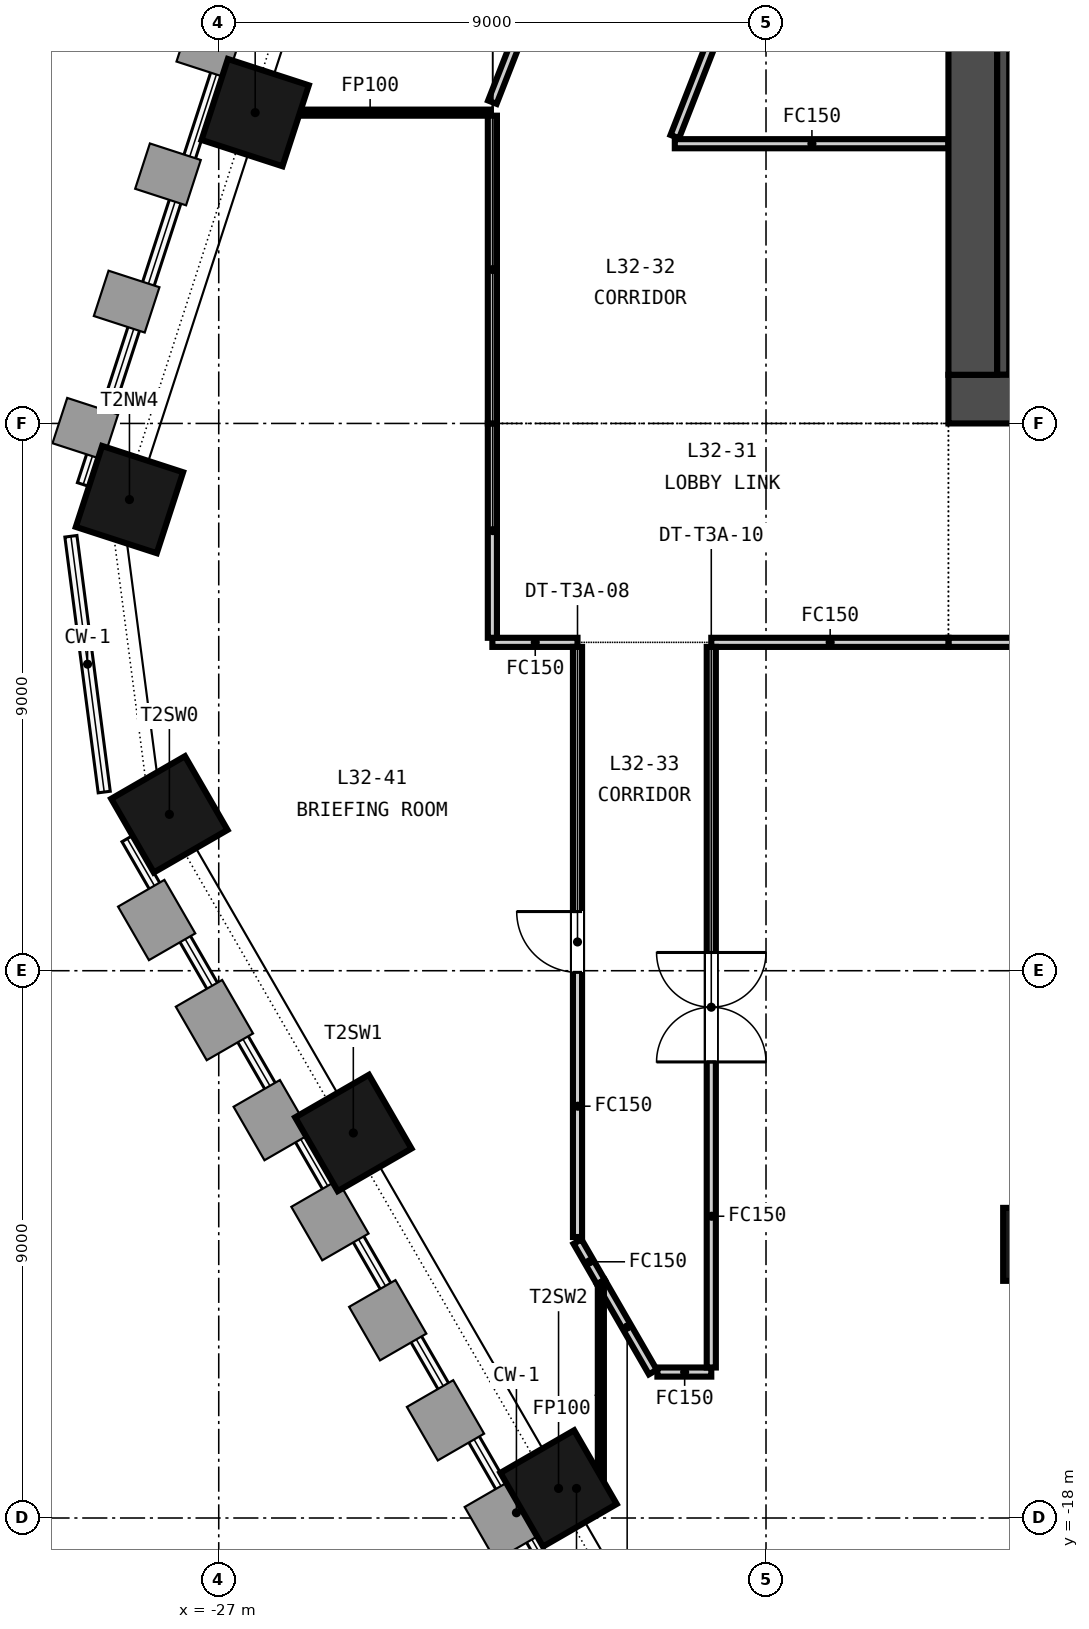
"""IFC4 building model, lengths in metres.
Left out: names, types, materials, properties, quantities, classifications, styles, units other than length and angle.
Written with IfcOpenShell. Run it as: python <this file> out.ifc"""

import sys

from ifc_helpers import new_model, si_unit, direction, frame, frame_2d, origin, origin_2d, place, context, subcontext, project, spatial, rectangle, extrude, element, fill, save


model = new_model("IFC4")
c1 = context("Model", 3, precision=1e-05, world=origin(), true_north=direction((0.0, 1.0)))
c2 = subcontext(c1, "Body", "Model", "MODEL_VIEW")
j1 = project(units=[si_unit("LENGTHUNIT", "METRE"), si_unit("PLANEANGLEUNIT", "RADIAN")], contexts=[c1])
p1 = place(None, origin())
s1 = spatial("IfcSite", under=j1, at=p1, CompositionType="ELEMENT")
p2 = place(p1, origin())
s2 = spatial("IfcBuilding", under=s1, at=p2, CompositionType="ELEMENT")
p3 = place(p2, frame((0.0, 0.0, 133.45)))
s3 = spatial("IfcBuildingStorey", under=s2, at=p3, CompositionType="ELEMENT", Elevation=133.45)
p4 = place(p3, frame((-15.0, 0.4, -0.15), z_axis=(0.0, 0.0, 1.0), x_axis=(1.0, 0.0, 0.0)))
e1 = element("IfcWall", 1, at=p4, inside=s3, PredefinedType="SOLIDWALL", context=c2, shape_type="SweptSolid", body=[
    extrude(rectangle(XDim=30.0, YDim=0.8, at=frame_2d((15.0, 0.0))), origin(), (0.0, 0.0, 1.0), 3.65),
])
p5 = place(p4, frame((5.8, 0.0, 0.15)))
e2 = element("IfcOpeningElement", 2, at=p5, cuts=e1, PredefinedType="OPENING", context=c2, shape_type="SweptSolid", body=[
    extrude(rectangle(XDim=2.4, YDim=2.4, at=frame_2d((1.2, 1.2))), frame((0.0, 0.41, 0.0), z_axis=(0.0, -1.0, 0.0), x_axis=(1.0, 0.0, 0.0)), (0.0, 0.0, 1.0), 0.82),
])
p6 = place(p4, frame((13.8, 0.0, 0.15)))
e3 = element("IfcOpeningElement", 3, at=p6, cuts=e1, PredefinedType="OPENING", context=c2, shape_type="SweptSolid", body=[
    extrude(rectangle(XDim=2.4, YDim=2.4, at=frame_2d((1.2, 1.2))), frame((0.0, 0.41, 0.0), z_axis=(0.0, -1.0, 0.0), x_axis=(1.0, 0.0, 0.0)), (0.0, 0.0, 1.0), 0.82),
])
p7 = place(p4, frame((21.8, 0.0, 0.15)))
e4 = element("IfcOpeningElement", 4, at=p7, cuts=e1, PredefinedType="OPENING", context=c2, shape_type="SweptSolid", body=[
    extrude(rectangle(XDim=2.4, YDim=2.4, at=frame_2d((1.2, 1.2))), frame((0.0, 0.41, 0.0), z_axis=(0.0, -1.0, 0.0), x_axis=(1.0, 0.0, 0.0)), (0.0, 0.0, 1.0), 0.82),
])
p8 = place(p4, frame((1.5, 0.0, 0.15)))
e5 = element("IfcOpeningElement", 5, at=p8, cuts=e1, PredefinedType="OPENING", context=c2, shape_type="SweptSolid", body=[
    extrude(rectangle(XDim=1.2, YDim=2.1, at=frame_2d((0.6, 1.05))), frame((0.0, 0.41, 0.0), z_axis=(0.0, -1.0, 0.0), x_axis=(1.0, 0.0, 0.0)), (0.0, 0.0, 1.0), 0.82),
])
p9 = place(p4, frame((27.3, 0.0, 0.15)))
e6 = element("IfcOpeningElement", 6, at=p9, cuts=e1, PredefinedType="OPENING", context=c2, shape_type="SweptSolid", body=[
    extrude(rectangle(XDim=1.2, YDim=2.1, at=frame_2d((0.6, 1.05))), frame((0.0, 0.41, 0.0), z_axis=(0.0, -1.0, 0.0), x_axis=(1.0, 0.0, 0.0)), (0.0, 0.0, 1.0), 0.82),
])
p10 = place(p3, frame((-14.6, 0.8, -0.15), z_axis=(0.0, 0.0, 1.0), x_axis=(0.0, 1.0, 0.0)))
e7 = element("IfcWall", 7, at=p10, inside=s3, PredefinedType="SOLIDWALL", context=c2, shape_type="SweptSolid", body=[
    extrude(rectangle(XDim=13.4, YDim=0.8, at=frame_2d((6.7, 0.0))), origin(), (0.0, 0.0, 1.0), 3.65),
])
for number, where, z_axis, x_axis in (
    (8, (-26.401, 5.111, -0.15), (0.0, 0.0, 1.0), (-0.309, -0.951, 0.0)),
    (9, (-28.468, -1.252, -0.15), (0.0, 0.0, 1.0), (-0.309, -0.951, 0.0)),
    (10, (-27.812, -6.429, -0.15), (0.0, 0.0, 1.0), (0.5, -0.866, 0.0)),
    (11, (-24.787, -11.668, -0.15), (0.0, 0.0, 1.0), (0.5, -0.866, 0.0)),
    (12, (-21.412, -17.514, -0.15), (0.0, 0.0, 1.0), (0.5, -0.866, 0.0)),
):
    element("IfcColumn", number, at=place(p3, frame(where, z_axis=z_axis, x_axis=x_axis)), inside=s3, PredefinedType="COLUMN", context=c2, shape_type="SweptSolid", body=[
        extrude(rectangle(XDim=1.4, YDim=1.4, at=origin_2d()), origin(), (0.0, 0.0, 1.0), 3.65),
    ])
p11 = place(p3, frame((-13.5, -13.5, -0.15), z_axis=(0.0, 0.0, 1.0), x_axis=(1.0, 0.0, 0.0)))
e13 = element("IfcColumn", 13, at=p11, inside=s3, PredefinedType="COLUMN", context=c2, shape_type="SweptSolid", body=[
    extrude(rectangle(XDim=1.2, YDim=1.2, at=origin_2d()), origin(), (0.0, 0.0, 1.0), 3.65),
])
p12 = place(p3, frame((-14.1, 0.8, 0.0), z_axis=(0.0, 0.0, 1.0), x_axis=(0.0, 1.0, 0.0)))
e14 = element("IfcWall", 14, at=p12, inside=s3, PredefinedType="SOLIDWALL", context=c2, shape_type="SweptSolid", body=[
    extrude(rectangle(XDim=13.4, YDim=0.2, at=frame_2d((6.7, 0.0))), origin(), (0.0, 0.0, 1.0), 3.5),
])
p13 = place(p3, frame((15.0, -3.6, 0.0), z_axis=(0.0, 0.0, 1.0), x_axis=(-1.0, 0.0, 0.0)))
e15 = element("IfcWall", 15, at=p13, inside=s3, PredefinedType="PARTITIONING", context=c2, shape_type="SweptSolid", body=[
    extrude(rectangle(XDim=30.0, YDim=0.15, at=frame_2d((15.0, 0.0))), origin(), (0.0, 0.0, 1.0), 2.741),
])
p14 = place(p13, frame((14.1, 0.0, 0.0)))
e16 = element("IfcOpeningElement", 16, at=p14, cuts=e15, PredefinedType="OPENING", context=c2, shape_type="SweptSolid", body=[
    extrude(rectangle(XDim=1.8, YDim=2.1, at=frame_2d((0.9, 1.05))), frame((0.0, 0.085, 0.0), z_axis=(0.0, -1.0, 0.0), x_axis=(1.0, 0.0, 0.0)), (0.0, 0.0, 1.0), 0.17),
])
p15 = place(p3, frame((-21.1, -3.6, 0.0), z_axis=(0.0, 0.0, 1.0), x_axis=(-1.0, 0.0, 0.0)))
e17 = element("IfcWall", 17, at=p15, inside=s3, PredefinedType="PARTITIONING", context=c2, shape_type="SweptSolid", body=[
    extrude(rectangle(XDim=1.4, YDim=0.15, at=frame_2d((0.7, 0.0))), origin(), (0.0, 0.0, 1.0), 2.741),
])
p16 = place(p3, frame((-15.0, -3.6, 0.0), z_axis=(0.0, 0.0, 1.0), x_axis=(-1.0, 0.0, 0.0)))
e18 = element("IfcWall", 18, at=p16, inside=s3, PredefinedType="PARTITIONING", context=c2, shape_type="SweptSolid", body=[
    extrude(rectangle(XDim=3.9, YDim=0.15, at=frame_2d((1.95, 0.0))), origin(), (0.0, 0.0, 1.0), 2.741),
])
p17 = place(p3, frame((-15.476, 15.0, 0.0), z_axis=(0.0, 0.0, 1.0), x_axis=(-0.364411853206, -0.931237886494, 0.0)))
e19 = element("IfcWall", 19, at=p17, inside=s3, PredefinedType="PARTITIONING", context=c2, shape_type="SweptSolid", body=[
    extrude(rectangle(XDim=11.042, YDim=0.15, at=frame_2d((5.521, 0.0))), origin(), (0.0, 0.0, 1.0), 2.741),
])
p18 = place(p17, frame((5.021, 0.0, 0.0)))
e20 = element("IfcOpeningElement", 20, at=p18, cuts=e19, PredefinedType="OPENING", context=c2, shape_type="SweptSolid", body=[
    extrude(rectangle(XDim=1.0, YDim=2.1, at=frame_2d((0.5, 1.05))), frame((0.0, 0.085, 0.0), z_axis=(0.0, -1.0, 0.0), x_axis=(1.0, 0.0, 0.0)), (0.0, 0.0, 1.0), 0.17),
])
p19 = place(p3, frame((-20.716, -14.119, 0.0), z_axis=(0.0, 0.0, 1.0), x_axis=(-0.500208722528, 0.865904864236, 0.0)))
e21 = element("IfcWall", 21, at=p19, inside=s3, PredefinedType="PARTITIONING", context=c2, shape_type="SweptSolid", body=[
    extrude(rectangle(XDim=0.768, YDim=0.15, at=frame_2d((0.384, 0.0))), origin(), (0.0, 0.0, 1.0), 2.741),
])
p20 = place(p3, frame((-19.861, -15.6, 0.0), z_axis=(0.0, 0.0, 1.0), x_axis=(-0.499916050814, 0.866073866445, 0.0)))
e22 = element("IfcWall", 22, at=p20, inside=s3, PredefinedType="PARTITIONING", context=c2, shape_type="SweptSolid", body=[
    extrude(rectangle(XDim=1.71, YDim=0.15, at=frame_2d((0.855, 0.0))), origin(), (0.0, 0.0, 1.0), 2.741),
])
p21 = place(p3, frame((-18.9, -15.6, 0.0), z_axis=(0.0, 0.0, 1.0), x_axis=(-1.0, 0.0, 0.0)))
e23 = element("IfcWall", 23, at=p21, inside=s3, PredefinedType="PARTITIONING", context=c2, shape_type="SweptSolid", body=[
    extrude(rectangle(XDim=0.886, YDim=0.15, at=frame_2d((0.443, 0.0))), origin(), (0.0, 0.0, 1.0), 2.741),
])
p22 = place(p3, frame((-18.9, -3.675, 0.0), z_axis=(0.0, 0.0, 1.0), x_axis=(0.0, -1.0, 0.0)))
e24 = element("IfcWall", 24, at=p22, inside=s3, PredefinedType="PARTITIONING", context=c2, shape_type="SweptSolid", body=[
    extrude(rectangle(XDim=11.85, YDim=0.15, at=frame_2d((5.925, 0.0))), origin(), (0.0, 0.0, 1.0), 2.741),
])
p23 = place(p22, frame((5.025, 0.0, 0.0)))
e25 = element("IfcOpeningElement", 25, at=p23, cuts=e24, PredefinedType="OPENING", context=c2, shape_type="SweptSolid", body=[
    extrude(rectangle(XDim=1.8, YDim=2.1, at=frame_2d((0.9, 1.05))), frame((0.0, 0.085, 0.0), z_axis=(0.0, -1.0, 0.0), x_axis=(1.0, 0.0, 0.0)), (0.0, 0.0, 1.0), 0.17),
])
p24 = place(p3, frame((-22.5, 5.283, 0.0), z_axis=(0.0, 0.0, 1.0), x_axis=(0.364389237236, 0.931246736256, 0.0)))
e26 = element("IfcWall", 26, at=p24, inside=s3, PredefinedType="PARTITIONING", context=c2, shape_type="SweptSolid", body=[
    extrude(rectangle(XDim=13.656, YDim=0.15, at=frame_2d((6.828, 0.0))), origin(), (0.0, 0.0, 1.0), 2.741),
])
p25 = place(p24, frame((6.328, 0.0, 0.0)))
e27 = element("IfcOpeningElement", 27, at=p25, cuts=e26, PredefinedType="OPENING", context=c2, shape_type="SweptSolid", body=[
    extrude(rectangle(XDim=1.0, YDim=2.1, at=frame_2d((0.5, 1.05))), frame((0.0, 0.085, 0.0), z_axis=(0.0, -1.0, 0.0), x_axis=(1.0, 0.0, 0.0)), (0.0, 0.0, 1.0), 0.17),
])
p26 = place(p3, frame((-26.506, 5.111, 0.0), z_axis=(0.0, 0.0, 1.0), x_axis=(1.0, 0.0, 0.0)))
e28 = element("IfcWall", 28, at=p26, inside=s3, PredefinedType="PARTITIONING", context=c2, shape_type="SweptSolid", body=[
    extrude(rectangle(XDim=3.981, YDim=0.1, at=frame_2d((1.991, 0.0))), origin(), (0.0, 0.0, 1.0), 2.741),
])
p27 = place(p3, frame((-19.5, 4.6, 0.0), z_axis=(0.0, 0.0, 1.0), x_axis=(1.0, 0.0, 0.0)))
e29 = element("IfcWall", 29, at=p27, inside=s3, PredefinedType="PARTITIONING", context=c2, shape_type="SweptSolid", body=[
    extrude(rectangle(XDim=4.5, YDim=0.15, at=frame_2d((2.25, 0.0))), origin(), (0.0, 0.0, 1.0), 2.741),
])
p28 = place(p3, frame((-22.5, -3.525, 0.0), z_axis=(0.0, 0.0, 1.0), x_axis=(0.0, 1.0, 0.0)))
e30 = element("IfcWall", 30, at=p28, inside=s3, PredefinedType="PARTITIONING", context=c2, shape_type="SweptSolid", body=[
    extrude(rectangle(XDim=3.525, YDim=0.15, at=frame_2d((1.762, 0.0))), origin(), (0.0, 0.0, 1.0), 2.741),
])
p29 = place(p3, frame((-22.5, 0.0, 0.0), z_axis=(0.0, 0.0, 1.0), x_axis=(0.0, 1.0, 0.0)))
e31 = element("IfcWall", 31, at=p29, inside=s3, PredefinedType="PARTITIONING", context=c2, shape_type="SweptSolid", body=[
    extrude(rectangle(XDim=5.061, YDim=0.15, at=frame_2d((2.531, 0.0))), origin(), (0.0, 0.0, 1.0), 2.741),
])
p30 = place(p3, frame((-21.1, -13.379, 0.0), z_axis=(0.0, 0.0, 1.0), x_axis=(0.0, 1.0, 0.0)))
e32 = element("IfcWall", 32, at=p30, inside=s3, PredefinedType="PARTITIONING", context=c2, shape_type="SweptSolid", body=[
    extrude(rectangle(XDim=9.704, YDim=0.15, at=frame_2d((4.852, 0.0))), origin(), (0.0, 0.0, 1.0), 2.741),
])
p31 = place(p30, frame((4.352, 0.0, 0.0)))
e33 = element("IfcOpeningElement", 33, at=p31, cuts=e32, PredefinedType="OPENING", context=c2, shape_type="SweptSolid", body=[
    extrude(rectangle(XDim=1.0, YDim=2.1, at=frame_2d((0.5, 1.05))), frame((0.0, 0.085, 0.0), z_axis=(0.0, -1.0, 0.0), x_axis=(1.0, 0.0, 0.0)), (0.0, 0.0, 1.0), 0.17),
])
p32 = place(p3, frame((-21.527, -17.514, 0.0), z_axis=(0.0, 0.0, 1.0), x_axis=(1.0, 0.0, 0.0)))
e34 = element("IfcWall", 34, at=p32, inside=s3, PredefinedType="PARTITIONING", context=c2, shape_type="SweptSolid", body=[
    extrude(rectangle(XDim=0.811, YDim=0.1, at=frame_2d((0.406, 0.0))), origin(), (0.0, 0.0, 1.0), 2.741),
])
p33 = place(p3, frame((-20.716, -17.464, 0.0), z_axis=(0.0, 0.0, 1.0), x_axis=(0.0, 1.0, 0.0)))
e35 = element("IfcWall", 35, at=p33, inside=s3, PredefinedType="PARTITIONING", context=c2, shape_type="SweptSolid", body=[
    extrude(rectangle(XDim=3.27, YDim=0.1, at=frame_2d((1.635, 0.0))), origin(), (0.0, 0.0, 1.0), 2.741),
])
p34 = place(p31, origin())
e36 = element("IfcDoor", 36, at=p34, inside=s3, OperationType="SINGLE_SWING_RIGHT", PredefinedType="DOOR", context=c2, shape_type="SweptSolid", body=[
    extrude(rectangle(XDim=1.0, YDim=2.1, at=frame_2d((0.5, 1.05))), frame((0.0, 0.025, 0.0), z_axis=(0.0, -1.0, 0.0), x_axis=(1.0, 0.0, 0.0)), (0.0, 0.0, 1.0), 0.05),
])
fill(e33, e36)
p35 = place(p23, origin())
e37 = element("IfcDoor", 37, at=p35, inside=s3, OperationType="DOUBLE_DOOR_DOUBLE_SWING", PredefinedType="DOOR", context=c2, shape_type="SweptSolid", body=[
    extrude(rectangle(XDim=1.8, YDim=2.1, at=frame_2d((0.9, 1.05))), frame((0.0, 0.025, 0.0), z_axis=(0.0, -1.0, 0.0), x_axis=(1.0, 0.0, 0.0)), (0.0, 0.0, 1.0), 0.05),
])
fill(e25, e37)
save(model, sys.argv[1])
